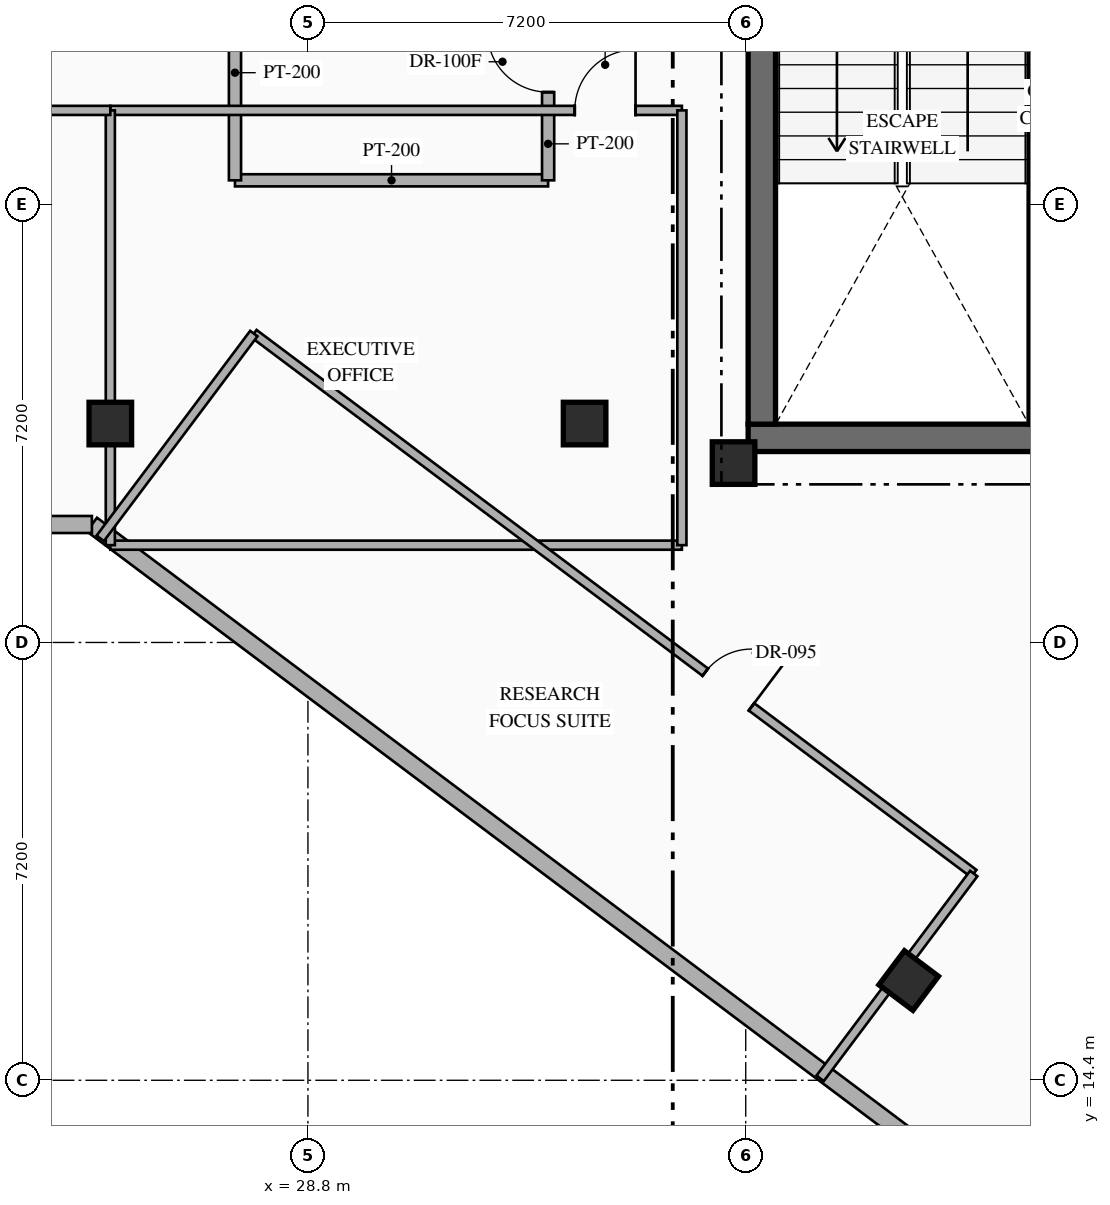
"""IFC4 building model, lengths in metres.
Left out: names, types, materials, properties, quantities, classifications, styles, units other than length and angle.
Written with IfcOpenShell. Run it as: python <this file> out.ifc"""

import sys

from ifc_helpers import new_model, si_unit, direction, frame, frame_2d, origin, origin_2d, place, context, subcontext, project, spatial, rectangle, hollow_rectangle, extrude, element, fill, save


model = new_model("IFC4")
c1 = context("Model", 3, precision=1e-05, world=origin(), true_north=direction((0.0, 1.0)))
c2 = subcontext(c1, "Body", "Model", "MODEL_VIEW")
j1 = project(units=[si_unit("LENGTHUNIT", "METRE"), si_unit("PLANEANGLEUNIT", "RADIAN")], contexts=[c1])
p1 = place(None, origin())
s1 = spatial("IfcSite", under=j1, at=p1, CompositionType="ELEMENT")
p2 = place(p1, origin())
s2 = spatial("IfcBuilding", under=s1, at=p2, CompositionType="ELEMENT")
p3 = place(p2, frame((0.0, 0.0, 220.35)))
s3 = spatial("IfcBuildingStorey", under=s2, at=p3, CompositionType="ELEMENT", Elevation=220.35)
p4 = place(p3, frame((36.04, 24.965, 0.0), z_axis=(0.0, 0.0, 1.0), x_axis=(1.0, 0.0, 0.0)))
e1 = element("IfcWall", 1, at=p4, inside=s3, PredefinedType="SHEAR", context=c2, shape_type="SweptSolid", body=[
    extrude(rectangle(XDim=7.46, YDim=0.45, at=frame_2d((3.73, 0.0))), origin(), (0.0, 0.0, 1.0), 3.6),
])
p5 = place(p3, frame((36.265, 25.19, 0.0), z_axis=(0.0, 0.0, 1.0), x_axis=(0.0, 1.0, 0.0)))
e2 = element("IfcWall", 2, at=p5, inside=s3, PredefinedType="SHEAR", context=c2, shape_type="SweptSolid", body=[
    extrude(rectangle(XDim=9.48, YDim=0.45, at=frame_2d((4.74, 0.0))), origin(), (0.0, 0.0, 1.0), 3.6),
])
p6 = place(p3, frame((40.81, 25.19, 0.0), z_axis=(0.0, 0.0, 1.0), x_axis=(0.0, 1.0, 0.0)))
e3 = element("IfcWall", 3, at=p6, inside=s3, PredefinedType="SHEAR", context=c2, shape_type="SweptSolid", body=[
    extrude(rectangle(XDim=9.48, YDim=0.3, at=frame_2d((4.74, 0.0))), origin(), (0.0, 0.0, 1.0), 3.6),
])
for number, where, z_axis, x_axis in (
    (4, (35.8, 24.55, 0.0), (0.0, 0.0, 1.0), (1.0, 0.0, 0.0)),
    (5, (25.55, 25.2, 0.0), (0.0, 0.0, 1.0), (1.0, 0.0, 0.0)),
    (6, (33.35, 25.2, 0.0), (0.0, 0.0, 1.0), (1.0, 0.0, 0.0)),
    (7, (38.68, 16.04, 0.0), (0.0, 0.0, 1.0), (0.8, -0.6, 0.0)),
):
    element("IfcColumn", number, at=place(p3, frame(where, z_axis=z_axis, x_axis=x_axis)), inside=s3, PredefinedType="COLUMN", context=c2, shape_type="SweptSolid", body=[
        extrude(hollow_rectangle(XDim=0.7, YDim=0.7, WallThickness=0.028, at=origin_2d()), origin(), (0.0, 0.0, 1.0), 3.6),
    ])
p7 = place(p3, frame((44.918, 8.787, 0.0), z_axis=(0.0, 0.0, 1.0), x_axis=(-0.800004765927, 0.599993645378, 0.0)))
e8 = element("IfcWall", 8, at=p7, inside=s3, PredefinedType="STANDARD", context=c2, shape_type="SweptSolid", body=[
    extrude(rectangle(XDim=24.588, YDim=0.28, at=frame_2d((12.294, 0.0))), origin(), (0.0, 0.0, 1.0), 3.35),
])
p8 = place(p3, frame((25.247, 23.54, 0.0), z_axis=(0.0, 0.0, 1.0), x_axis=(-1.0, 0.0, 0.0)))
e9 = element("IfcWall", 9, at=p8, inside=s3, PredefinedType="STANDARD", context=c2, shape_type="SweptSolid", body=[
    extrude(rectangle(XDim=4.789, YDim=0.28, at=frame_2d((2.395, 0.0))), origin(), (0.0, 0.0, 1.0), 3.35),
])
p9 = place(p3, frame((27.6, 29.2, 0.0), z_axis=(0.0, 0.0, 1.0), x_axis=(1.0, 0.0, 0.0)))
e10 = element("IfcWall", 10, at=p9, inside=s3, PredefinedType="STANDARD", context=c2, shape_type="SweptSolid", body=[
    extrude(rectangle(XDim=5.15, YDim=0.2, at=frame_2d((2.575, 0.0))), origin(), (0.0, 0.0, 1.0), 3.35),
])
p10 = place(p3, frame((27.6, 29.2, 0.0), z_axis=(0.0, 0.0, 1.0), x_axis=(0.0, 1.0, 0.0)))
e11 = element("IfcWall", 11, at=p10, inside=s3, PredefinedType="STANDARD", context=c2, shape_type="SweptSolid", body=[
    extrude(rectangle(XDim=3.54, YDim=0.2, at=frame_2d((1.77, 0.0))), origin(), (0.0, 0.0, 1.0), 3.35),
])
p11 = place(p3, frame((32.75, 29.2, 0.0), z_axis=(0.0, 0.0, 1.0), x_axis=(0.0, 1.0, 0.0)))
e12 = element("IfcWall", 12, at=p11, inside=s3, PredefinedType="STANDARD", context=c2, shape_type="SweptSolid", body=[
    extrude(rectangle(XDim=3.54, YDim=0.2, at=frame_2d((1.77, 0.0))), origin(), (0.0, 0.0, 1.0), 3.35),
])
p12 = place(p11, frame((1.45, 0.0, 0.0)))
e13 = element("IfcOpeningElement", 13, at=p12, cuts=e12, PredefinedType="OPENING", context=c2, shape_type="SweptSolid", body=[
    extrude(rectangle(XDim=1.0, YDim=2.2, at=frame_2d((0.5, 1.1))), frame((0.0, 0.11, 0.0), z_axis=(0.0, -1.0, 0.0), x_axis=(1.0, 0.0, 0.0)), (0.0, 0.0, 1.0), 0.22),
])
p13 = place(p3, frame((25.55, 23.2, 0.0), z_axis=(0.0, 0.0, 1.0), x_axis=(1.0, 0.0, 0.0)))
e14 = element("IfcWall", 14, at=p13, inside=s3, PredefinedType="PARTITIONING", context=c2, shape_type="SweptSolid", body=[
    extrude(rectangle(XDim=9.4, YDim=0.15, at=frame_2d((4.7, 0.0))), origin(), (0.0, 0.0, 1.0), 3.35),
])
p14 = place(p3, frame((25.55, 30.35, 0.0), z_axis=(0.0, 0.0, 1.0), x_axis=(1.0, 0.0, 0.0)))
e15 = element("IfcWall", 15, at=p14, inside=s3, PredefinedType="PARTITIONING", context=c2, shape_type="SweptSolid", body=[
    extrude(rectangle(XDim=9.4, YDim=0.15, at=frame_2d((4.7, 0.0))), origin(), (0.0, 0.0, 1.0), 3.35),
])
p15 = place(p14, frame((7.638, 0.0, 0.0)))
e16 = element("IfcOpeningElement", 16, at=p15, cuts=e15, PredefinedType="OPENING", context=c2, shape_type="SweptSolid", body=[
    extrude(rectangle(XDim=1.0, YDim=2.15, at=frame_2d((0.5, 1.075))), frame((0.0, 0.085, 0.0), z_axis=(0.0, -1.0, 0.0), x_axis=(1.0, 0.0, 0.0)), (0.0, 0.0, 1.0), 0.17),
])
p16 = place(p3, frame((25.55, 23.2, 0.0), z_axis=(0.0, 0.0, 1.0), x_axis=(0.0, 1.0, 0.0)))
e17 = element("IfcWall", 17, at=p16, inside=s3, PredefinedType="PARTITIONING", context=c2, shape_type="SweptSolid", body=[
    extrude(rectangle(XDim=7.15, YDim=0.15, at=frame_2d((3.575, 0.0))), origin(), (0.0, 0.0, 1.0), 2.757),
])
p17 = place(p3, frame((34.95, 23.2, 0.0), z_axis=(0.0, 0.0, 1.0), x_axis=(0.0, 1.0, 0.0)))
e18 = element("IfcWall", 18, at=p17, inside=s3, PredefinedType="PARTITIONING", context=c2, shape_type="SweptSolid", body=[
    extrude(rectangle(XDim=7.15, YDim=0.15, at=frame_2d((3.575, 0.0))), origin(), (0.0, 0.0, 1.0), 3.35),
])
p18 = place(p3, frame((22.25, 30.35, 0.0), z_axis=(0.0, 0.0, 1.0), x_axis=(1.0, 0.0, 0.0)))
e19 = element("IfcWall", 19, at=p18, inside=s3, PredefinedType="PARTITIONING", context=c2, shape_type="SweptSolid", body=[
    extrude(rectangle(XDim=3.3, YDim=0.15, at=frame_2d((1.65, 0.0))), origin(), (0.0, 0.0, 1.0), 3.35),
])
p19 = place(p18, frame((1.175, 0.0, 0.0)))
e20 = element("IfcOpeningElement", 20, at=p19, cuts=e19, PredefinedType="OPENING", context=c2, shape_type="SweptSolid", body=[
    extrude(rectangle(XDim=0.95, YDim=2.15, at=frame_2d((0.475, 1.075))), frame((0.0, 0.085, 0.0), z_axis=(0.0, -1.0, 0.0), x_axis=(1.0, 0.0, 0.0)), (0.0, 0.0, 1.0), 0.17),
])
p20 = place(p3, frame((27.91, 26.68, 0.0), z_axis=(0.0, 0.0, 1.0), x_axis=(0.800005938517, -0.599992081896, 0.0)))
e21 = element("IfcWall", 21, at=p20, inside=s3, PredefinedType="PARTITIONING", context=c2, shape_type="SweptSolid", body=[
    extrude(rectangle(XDim=14.8, YDim=0.15, at=frame_2d((7.4, 0.0))), origin(), (0.0, 0.0, 1.0), 3.35),
])
p21 = place(p20, frame((9.281, 0.0, 0.0)))
e22 = element("IfcOpeningElement", 22, at=p21, cuts=e21, PredefinedType="OPENING", context=c2, shape_type="SweptSolid", body=[
    extrude(rectangle(XDim=0.95, YDim=2.15, at=frame_2d((0.475, 1.075))), frame((0.0, 0.085, 0.0), z_axis=(0.0, -1.0, 0.0), x_axis=(1.0, 0.0, 0.0)), (0.0, 0.0, 1.0), 0.17),
])
p22 = place(p3, frame((25.384, 23.312, 0.0), z_axis=(0.0, 0.0, 1.0), x_axis=(0.599990721155, 0.80000695905, 0.0)))
e23 = element("IfcWall", 23, at=p22, inside=s3, PredefinedType="PARTITIONING", context=c2, shape_type="SweptSolid", body=[
    extrude(rectangle(XDim=4.21, YDim=0.15, at=frame_2d((2.105, 0.0))), origin(), (0.0, 0.0, 1.0), 3.35),
])
p23 = place(p3, frame((37.224, 14.432, 0.0), z_axis=(0.0, 0.0, 1.0), x_axis=(0.599962885857, 0.800027834262, 0.0)))
e24 = element("IfcWall", 24, at=p23, inside=s3, PredefinedType="PARTITIONING", context=c2, shape_type="SweptSolid", body=[
    extrude(rectangle(XDim=4.21, YDim=0.15, at=frame_2d((2.105, 0.0))), origin(), (0.0, 0.0, 1.0), 2.757),
])
p24 = place(p12, origin())
e25 = element("IfcDoor", 25, at=p24, inside=s3, OperationType="SINGLE_SWING_RIGHT", PredefinedType="DOOR", context=c2, shape_type="SweptSolid", body=[
    extrude(rectangle(XDim=1.0, YDim=2.2, at=frame_2d((0.5, 1.1))), frame((0.0, 0.025, 0.0), z_axis=(0.0, -1.0, 0.0), x_axis=(1.0, 0.0, 0.0)), (0.0, 0.0, 1.0), 0.05),
])
fill(e13, e25)
p25 = place(p15, origin())
e26 = element("IfcDoor", 26, at=p25, inside=s3, OperationType="SINGLE_SWING_RIGHT", PredefinedType="DOOR", context=c2, shape_type="SweptSolid", body=[
    extrude(rectangle(XDim=1.0, YDim=2.15, at=frame_2d((0.5, 1.075))), frame((0.0, 0.025, 0.0), z_axis=(0.0, -1.0, 0.0), x_axis=(1.0, 0.0, 0.0)), (0.0, 0.0, 1.0), 0.05),
])
fill(e16, e26)
p26 = place(p21, origin())
e27 = element("IfcDoor", 27, at=p26, inside=s3, OperationType="SINGLE_SWING_RIGHT", PredefinedType="DOOR", context=c2, shape_type="SweptSolid", body=[
    extrude(rectangle(XDim=0.95, YDim=2.15, at=frame_2d((0.475, 1.075))), frame((0.0, 0.025, 0.0), z_axis=(0.0, -1.0, 0.0), x_axis=(1.0, 0.0, 0.0)), (0.0, 0.0, 1.0), 0.05),
])
fill(e22, e27)
save(model, sys.argv[1])
